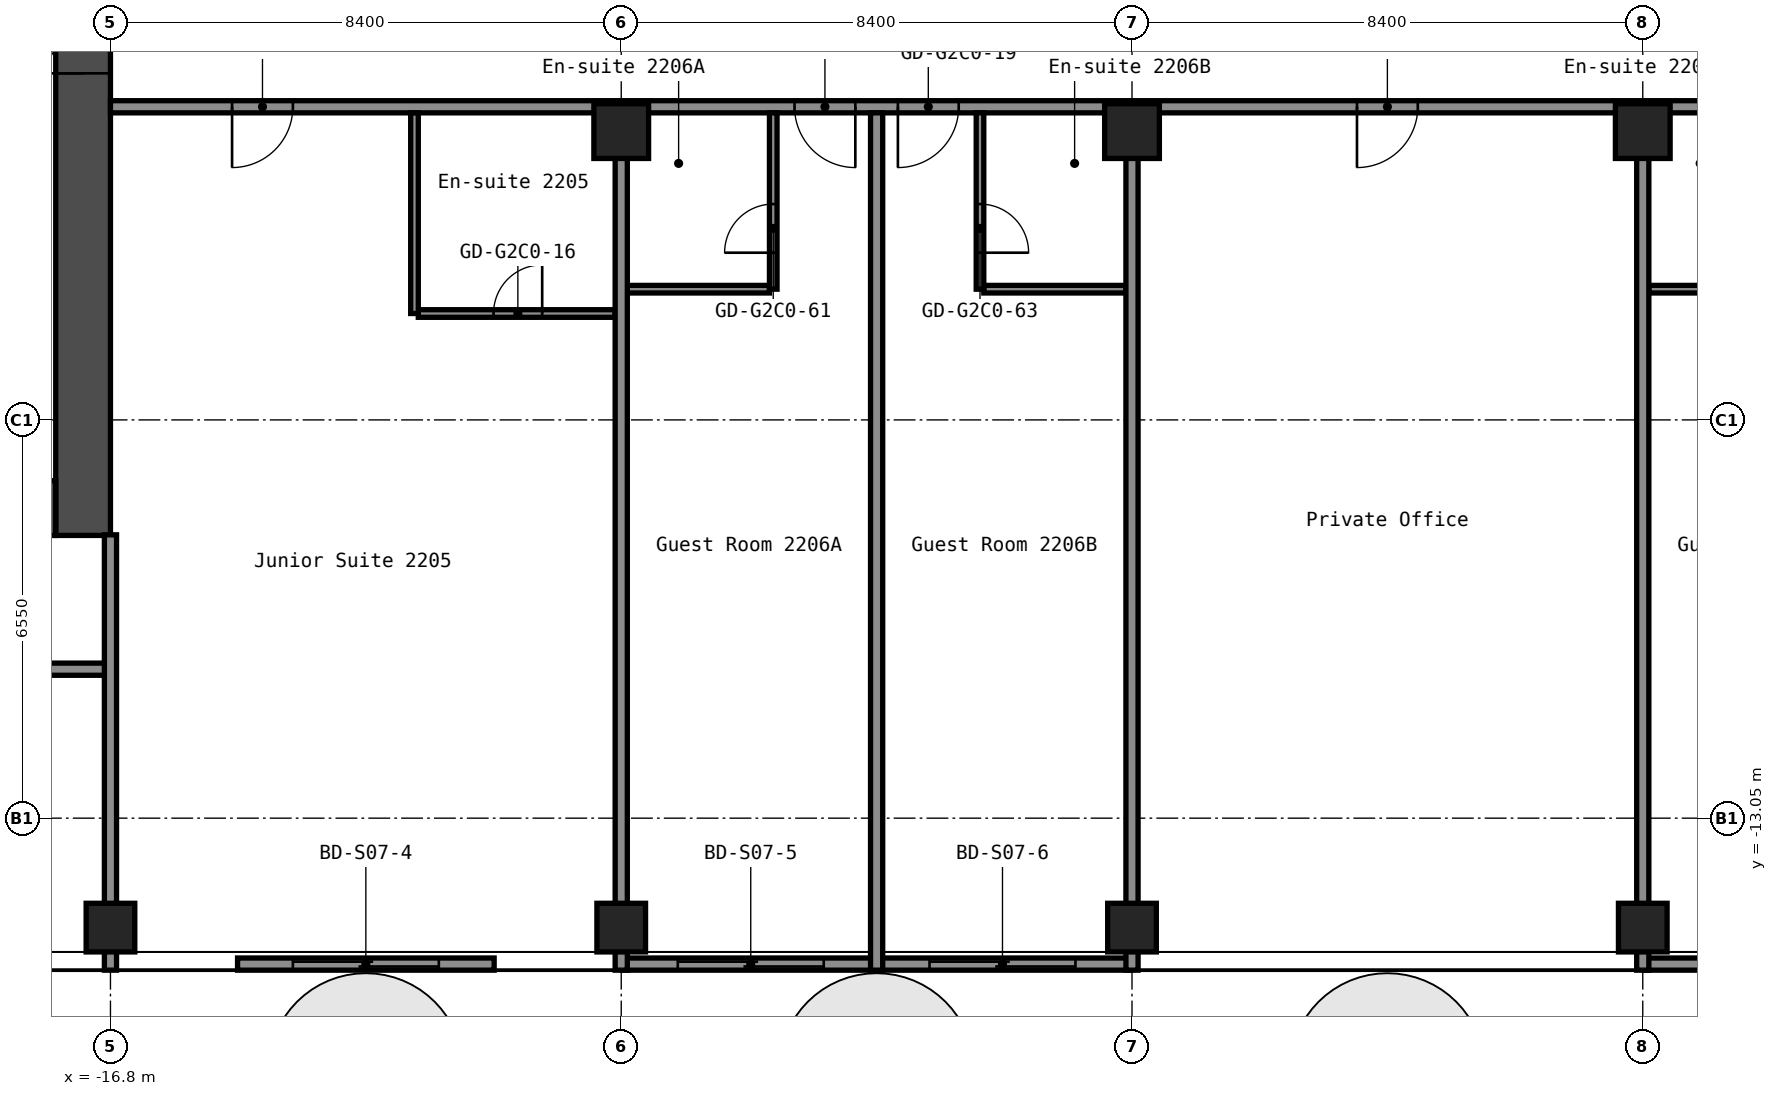
"""IFC4 building model, lengths in metres.
Left out: names, types, materials, properties, quantities, classifications, styles, units other than length and angle.
Written with IfcOpenShell. Run it as: python <this file> out.ifc"""

import sys

from ifc_helpers import new_model, si_unit, direction, frame, frame_2d, origin, origin_2d, place, context, subcontext, project, spatial, rectangle, hollow_rectangle, extrude, element, fill, save


model = new_model("IFC4")
c1 = context("Model", 3, precision=1e-05, world=origin(), true_north=direction((0.0, 1.0)))
c2 = subcontext(c1, "Body", "Model", "MODEL_VIEW")
j1 = project(units=[si_unit("LENGTHUNIT", "METRE"), si_unit("PLANEANGLEUNIT", "RADIAN")], contexts=[c1])
p1 = place(None, origin())
s1 = spatial("IfcSite", under=j1, at=p1, CompositionType="ELEMENT")
p2 = place(p1, origin())
s2 = spatial("IfcBuilding", under=s1, at=p2, CompositionType="ELEMENT")
p3 = place(p2, frame((0.0, 0.0, 81.8)))
s3 = spatial("IfcBuildingStorey", under=s2, at=p3, CompositionType="ELEMENT", Elevation=81.8)
for number, where, z_axis, x_axis in (
    (1, (-16.8, -14.85, 0.0), (0.0, 0.0, 1.0), (1.0, 0.0, 0.0)),
    (2, (-8.4, -14.85, 0.0), (0.0, 0.0, 1.0), (1.0, 0.0, 0.0)),
):
    element("IfcColumn", number, at=place(p3, frame(where, z_axis=z_axis, x_axis=x_axis)), inside=s3, PredefinedType="COLUMN", context=c2, shape_type="SweptSolid", body=[
        extrude(hollow_rectangle(XDim=0.8, YDim=0.8, WallThickness=0.032, at=origin_2d()), origin(), (0.0, 0.0, 1.0), 2.8),
    ])
p4 = place(p3, frame((-8.4, -1.75, 0.0), z_axis=(0.0, 0.0, 1.0), x_axis=(1.0, 0.0, 0.0)))
e3 = element("IfcColumn", 3, at=p4, inside=s3, PredefinedType="COLUMN", context=c2, shape_type="SweptSolid", body=[
    extrude(hollow_rectangle(XDim=0.9, YDim=0.9, WallThickness=0.036, at=origin_2d()), origin(), (0.0, 0.0, 1.0), 2.8),
])
p5 = place(p3, frame((0.0, -14.85, 0.0), z_axis=(0.0, 0.0, 1.0), x_axis=(1.0, 0.0, 0.0)))
e4 = element("IfcColumn", 4, at=p5, inside=s3, PredefinedType="COLUMN", context=c2, shape_type="SweptSolid", body=[
    extrude(hollow_rectangle(XDim=0.8, YDim=0.8, WallThickness=0.032, at=origin_2d()), origin(), (0.0, 0.0, 1.0), 2.8),
])
p6 = place(p3, frame((0.0, -1.75, 0.0), z_axis=(0.0, 0.0, 1.0), x_axis=(1.0, 0.0, 0.0)))
e5 = element("IfcColumn", 5, at=p6, inside=s3, PredefinedType="COLUMN", context=c2, shape_type="SweptSolid", body=[
    extrude(hollow_rectangle(XDim=0.9, YDim=0.9, WallThickness=0.036, at=origin_2d()), origin(), (0.0, 0.0, 1.0), 2.8),
])
p7 = place(p3, frame((8.4, -14.85, 0.0), z_axis=(0.0, 0.0, 1.0), x_axis=(1.0, 0.0, 0.0)))
e6 = element("IfcColumn", 6, at=p7, inside=s3, PredefinedType="COLUMN", context=c2, shape_type="SweptSolid", body=[
    extrude(hollow_rectangle(XDim=0.8, YDim=0.8, WallThickness=0.032, at=origin_2d()), origin(), (0.0, 0.0, 1.0), 2.8),
])
p8 = place(p3, frame((8.4, -1.75, 0.0), z_axis=(0.0, 0.0, 1.0), x_axis=(1.0, 0.0, 0.0)))
e7 = element("IfcColumn", 7, at=p8, inside=s3, PredefinedType="COLUMN", context=c2, shape_type="SweptSolid", body=[
    extrude(hollow_rectangle(XDim=0.9, YDim=0.9, WallThickness=0.036, at=origin_2d()), origin(), (0.0, 0.0, 1.0), 2.8),
])
p9 = place(p3, frame((-17.25, -8.4, 0.0), z_axis=(0.0, 0.0, 1.0), x_axis=(0.0, 1.0, 0.0)))
e8 = element("IfcWall", 8, at=p9, inside=s3, PredefinedType="SHEAR", context=c2, shape_type="SweptSolid", body=[
    extrude(rectangle(XDim=16.8, YDim=0.9, at=frame_2d((8.4, 0.0))), origin(), (0.0, 0.0, 1.0), 2.8),
])
p10 = place(p9, frame((7.6, 0.0, 0.0)))
e9 = element("IfcOpeningElement", 9, at=p10, cuts=e8, PredefinedType="OPENING", context=c2, shape_type="SweptSolid", body=[
    extrude(rectangle(XDim=1.2, YDim=2.1, at=frame_2d((0.6, 1.05))), frame((0.0, 0.46, 0.0), z_axis=(0.0, -1.0, 0.0), x_axis=(1.0, 0.0, 0.0)), (0.0, 0.0, 1.0), 0.92),
])
p11 = place(p3, frame((-32.7, -7.95, 0.0), z_axis=(0.0, 0.0, 1.0), x_axis=(1.0, 0.0, 0.0)))
e10 = element("IfcWall", 10, at=p11, inside=s3, PredefinedType="SHEAR", context=c2, shape_type="SweptSolid", body=[
    extrude(rectangle(XDim=15.0, YDim=0.9, at=frame_2d((7.5, 0.0))), origin(), (0.0, 0.0, 1.0), 2.8),
])
p12 = place(p11, frame((11.45, 0.0, 0.0)))
e11 = element("IfcOpeningElement", 11, at=p12, cuts=e10, PredefinedType="OPENING", context=c2, shape_type="SweptSolid", body=[
    extrude(rectangle(XDim=1.0, YDim=2.1, at=frame_2d((0.5, 1.05))), frame((0.0, 0.46, 0.0), z_axis=(0.0, -1.0, 0.0), x_axis=(1.0, 0.0, 0.0)), (0.0, 0.0, 1.0), 0.92),
])
p13 = place(p3, frame((-46.5, -10.6, 0.0), z_axis=(0.0, 0.0, 1.0), x_axis=(1.0, 0.0, 0.0)))
e12 = element("IfcWall", 12, at=p13, inside=s3, PredefinedType="PARTITIONING", context=c2, shape_type="SweptSolid", body=[
    extrude(rectangle(XDim=29.7, YDim=0.2, at=frame_2d((14.85, 0.0))), origin(), (0.0, 0.0, 1.0), 2.8),
])
p14 = place(p13, frame((1.95, 0.0, 0.0)))
e13 = element("IfcOpeningElement", 13, at=p14, cuts=e12, PredefinedType="OPENING", context=c2, shape_type="SweptSolid", body=[
    extrude(rectangle(XDim=0.9, YDim=2.1, at=frame_2d((0.45, 1.05))), frame((0.0, 0.11, 0.0), z_axis=(0.0, -1.0, 0.0), x_axis=(1.0, 0.0, 0.0)), (0.0, 0.0, 1.0), 0.22),
])
p15 = place(p13, frame((6.74, 0.0, 0.0)))
e14 = element("IfcOpeningElement", 14, at=p15, cuts=e12, PredefinedType="OPENING", context=c2, shape_type="SweptSolid", body=[
    extrude(rectangle(XDim=0.9, YDim=2.1, at=frame_2d((0.45, 1.05))), frame((0.0, 0.11, 0.0), z_axis=(0.0, -1.0, 0.0), x_axis=(1.0, 0.0, 0.0)), (0.0, 0.0, 1.0), 0.22),
])
p16 = place(p13, frame((10.94, 0.0, 0.0)))
e15 = element("IfcOpeningElement", 15, at=p16, cuts=e12, PredefinedType="OPENING", context=c2, shape_type="SweptSolid", body=[
    extrude(rectangle(XDim=0.9, YDim=2.1, at=frame_2d((0.45, 1.05))), frame((0.0, 0.11, 0.0), z_axis=(0.0, -1.0, 0.0), x_axis=(1.0, 0.0, 0.0)), (0.0, 0.0, 1.0), 0.22),
])
p17 = place(p13, frame((15.055, 0.0, 0.0)))
e16 = element("IfcOpeningElement", 16, at=p17, cuts=e12, PredefinedType="OPENING", context=c2, shape_type="SweptSolid", body=[
    extrude(rectangle(XDim=0.9, YDim=2.1, at=frame_2d((0.45, 1.05))), frame((0.0, 0.11, 0.0), z_axis=(0.0, -1.0, 0.0), x_axis=(1.0, 0.0, 0.0)), (0.0, 0.0, 1.0), 0.22),
])
p18 = place(p13, frame((19.255, 0.0, 0.0)))
e17 = element("IfcOpeningElement", 17, at=p18, cuts=e12, PredefinedType="OPENING", context=c2, shape_type="SweptSolid", body=[
    extrude(rectangle(XDim=0.9, YDim=2.1, at=frame_2d((0.45, 1.05))), frame((0.0, 0.11, 0.0), z_axis=(0.0, -1.0, 0.0), x_axis=(1.0, 0.0, 0.0)), (0.0, 0.0, 1.0), 0.22),
])
p19 = place(p13, frame((25.0, 0.0, 0.0)))
e18 = element("IfcOpeningElement", 18, at=p19, cuts=e12, PredefinedType="OPENING", context=c2, shape_type="SweptSolid", body=[
    extrude(rectangle(XDim=1.0, YDim=2.1, at=frame_2d((0.5, 1.05))), frame((0.0, 0.11, 0.0), z_axis=(0.0, -1.0, 0.0), x_axis=(1.0, 0.0, 0.0)), (0.0, 0.0, 1.0), 0.22),
])
p20 = place(p3, frame((-11.738, -4.75, 0.0), z_axis=(0.0, 0.0, 1.0), x_axis=(1.0, 0.0, 0.0)))
e19 = element("IfcWall", 19, at=p20, inside=s3, PredefinedType="PARTITIONING", context=c2, shape_type="SweptSolid", body=[
    extrude(rectangle(XDim=3.238, YDim=0.125, at=frame_2d((1.619, 0.0))), origin(), (0.0, 0.0, 1.0), 2.8),
])
p21 = place(p20, frame((1.238, 0.0, 0.0)))
e20 = element("IfcOpeningElement", 20, at=p21, cuts=e19, PredefinedType="OPENING", context=c2, shape_type="SweptSolid", body=[
    extrude(rectangle(XDim=0.8, YDim=2.1, at=frame_2d((0.4, 1.05))), frame((0.0, 0.073, 0.0), z_axis=(0.0, -1.0, 0.0), x_axis=(1.0, 0.0, 0.0)), (0.0, 0.0, 1.0), 0.145),
])
p22 = place(p3, frame((-8.3, -4.35, 0.0), z_axis=(0.0, 0.0, 1.0), x_axis=(1.0, 0.0, 0.0)))
e21 = element("IfcWall", 21, at=p22, inside=s3, PredefinedType="PARTITIONING", context=c2, shape_type="SweptSolid", body=[
    extrude(rectangle(XDim=2.338, YDim=0.125, at=frame_2d((1.169, 0.0))), origin(), (0.0, 0.0, 1.0), 2.8),
])
for number, where, z_axis, x_axis in (
    (22, (-2.438, -4.35, 0.0), (0.0, 0.0, 1.0), (1.0, 0.0, 0.0)),
    (23, (8.5, -4.35, 0.0), (0.0, 0.0, 1.0), (1.0, 0.0, 0.0)),
):
    element("IfcWall", number, at=place(p3, frame(where, z_axis=z_axis, x_axis=x_axis)), inside=s3, PredefinedType="PARTITIONING", context=c2, shape_type="SweptSolid", body=[
        extrude(rectangle(XDim=2.337, YDim=0.125, at=frame_2d((1.169, 0.0))), origin(), (0.0, 0.0, 1.0), 2.8),
    ])
p23 = place(p3, frame((-16.8, -1.35, 0.0), z_axis=(0.0, 0.0, 1.0), x_axis=(1.0, 0.0, 0.0)))
e24 = element("IfcWall", 24, at=p23, inside=s3, PredefinedType="PARTITIONING", context=c2, shape_type="SweptSolid", body=[
    extrude(rectangle(XDim=33.6, YDim=0.2, at=frame_2d((16.8, 0.0))), origin(), (0.0, 0.0, 1.0), 2.8),
])
p24 = place(p23, frame((2.0, 0.0, 0.0)))
e25 = element("IfcOpeningElement", 25, at=p24, cuts=e24, PredefinedType="OPENING", context=c2, shape_type="SweptSolid", body=[
    extrude(rectangle(XDim=1.0, YDim=2.1, at=frame_2d((0.5, 1.05))), frame((0.0, 0.11, 0.0), z_axis=(0.0, -1.0, 0.0), x_axis=(1.0, 0.0, 0.0)), (0.0, 0.0, 1.0), 0.22),
])
p25 = place(p23, frame((11.25, 0.0, 0.0)))
e26 = element("IfcOpeningElement", 26, at=p25, cuts=e24, PredefinedType="OPENING", context=c2, shape_type="SweptSolid", body=[
    extrude(rectangle(XDim=1.0, YDim=2.1, at=frame_2d((0.5, 1.05))), frame((0.0, 0.11, 0.0), z_axis=(0.0, -1.0, 0.0), x_axis=(1.0, 0.0, 0.0)), (0.0, 0.0, 1.0), 0.22),
])
p26 = place(p23, frame((12.95, 0.0, 0.0)))
e27 = element("IfcOpeningElement", 27, at=p26, cuts=e24, PredefinedType="OPENING", context=c2, shape_type="SweptSolid", body=[
    extrude(rectangle(XDim=1.0, YDim=2.1, at=frame_2d((0.5, 1.05))), frame((0.0, 0.11, 0.0), z_axis=(0.0, -1.0, 0.0), x_axis=(1.0, 0.0, 0.0)), (0.0, 0.0, 1.0), 0.22),
])
p27 = place(p23, frame((20.5, 0.0, 0.0)))
e28 = element("IfcOpeningElement", 28, at=p27, cuts=e24, PredefinedType="OPENING", context=c2, shape_type="SweptSolid", body=[
    extrude(rectangle(XDim=1.0, YDim=2.1, at=frame_2d((0.5, 1.05))), frame((0.0, 0.11, 0.0), z_axis=(0.0, -1.0, 0.0), x_axis=(1.0, 0.0, 0.0)), (0.0, 0.0, 1.0), 0.22),
])
p28 = place(p23, frame((28.05, 0.0, 0.0)))
e29 = element("IfcOpeningElement", 29, at=p28, cuts=e24, PredefinedType="OPENING", context=c2, shape_type="SweptSolid", body=[
    extrude(rectangle(XDim=1.0, YDim=2.1, at=frame_2d((0.5, 1.05))), frame((0.0, 0.11, 0.0), z_axis=(0.0, -1.0, 0.0), x_axis=(1.0, 0.0, 0.0)), (0.0, 0.0, 1.0), 0.22),
])
p29 = place(p23, frame((29.75, 0.0, 0.0)))
e30 = element("IfcOpeningElement", 30, at=p29, cuts=e24, PredefinedType="OPENING", context=c2, shape_type="SweptSolid", body=[
    extrude(rectangle(XDim=1.0, YDim=2.1, at=frame_2d((0.5, 1.05))), frame((0.0, 0.11, 0.0), z_axis=(0.0, -1.0, 0.0), x_axis=(1.0, 0.0, 0.0)), (0.0, 0.0, 1.0), 0.22),
])
p30 = place(p3, frame((-16.8, -15.55, 0.0), z_axis=(0.0, 0.0, 1.0), x_axis=(0.0, 1.0, 0.0)))
e31 = element("IfcWall", 31, at=p30, inside=s3, PredefinedType="PARTITIONING", context=c2, shape_type="SweptSolid", body=[
    extrude(rectangle(XDim=7.16, YDim=0.2, at=frame_2d((3.58, 0.0))), origin(), (0.0, 0.0, 1.0), 2.8),
])
p31 = place(p3, frame((-11.8, -4.75, 0.0), z_axis=(0.0, 0.0, 1.0), x_axis=(0.0, 1.0, 0.0)))
e32 = element("IfcWall", 32, at=p31, inside=s3, PredefinedType="PARTITIONING", context=c2, shape_type="SweptSolid", body=[
    extrude(rectangle(XDim=3.3, YDim=0.125, at=frame_2d((1.65, 0.0))), origin(), (0.0, 0.0, 1.0), 2.8),
])
p32 = place(p3, frame((-8.4, -15.55, 0.0), z_axis=(0.0, 0.0, 1.0), x_axis=(0.0, 1.0, 0.0)))
e33 = element("IfcWall", 33, at=p32, inside=s3, PredefinedType="PARTITIONING", context=c2, shape_type="SweptSolid", body=[
    extrude(rectangle(XDim=13.36, YDim=0.2, at=frame_2d((6.68, 0.0))), origin(), (0.0, 0.0, 1.0), 2.8),
])
p33 = place(p3, frame((-5.9, -4.35, 0.0), z_axis=(0.0, 0.0, 1.0), x_axis=(0.0, 1.0, 0.0)))
e34 = element("IfcWall", 34, at=p33, inside=s3, PredefinedType="PARTITIONING", context=c2, shape_type="SweptSolid", body=[
    extrude(rectangle(XDim=2.9, YDim=0.125, at=frame_2d((1.45, 0.0))), origin(), (0.0, 0.0, 1.0), 2.8),
])
p34 = place(p33, frame((0.6, 0.0, 0.0)))
e35 = element("IfcOpeningElement", 35, at=p34, cuts=e34, PredefinedType="OPENING", context=c2, shape_type="SweptSolid", body=[
    extrude(rectangle(XDim=0.8, YDim=2.1, at=frame_2d((0.4, 1.05))), frame((0.0, 0.073, 0.0), z_axis=(0.0, -1.0, 0.0), x_axis=(1.0, 0.0, 0.0)), (0.0, 0.0, 1.0), 0.145),
])
p35 = place(p3, frame((-4.2, -15.55, 0.0), z_axis=(0.0, 0.0, 1.0), x_axis=(0.0, 1.0, 0.0)))
e36 = element("IfcWall", 36, at=p35, inside=s3, PredefinedType="PARTITIONING", context=c2, shape_type="SweptSolid", body=[
    extrude(rectangle(XDim=14.1, YDim=0.2, at=frame_2d((7.05, 0.0))), origin(), (0.0, 0.0, 1.0), 2.8),
])
p36 = place(p3, frame((-2.5, -4.35, 0.0), z_axis=(0.0, 0.0, 1.0), x_axis=(0.0, 1.0, 0.0)))
e37 = element("IfcWall", 37, at=p36, inside=s3, PredefinedType="PARTITIONING", context=c2, shape_type="SweptSolid", body=[
    extrude(rectangle(XDim=2.9, YDim=0.125, at=frame_2d((1.45, 0.0))), origin(), (0.0, 0.0, 1.0), 2.8),
])
p37 = place(p36, frame((0.6, 0.0, 0.0)))
e38 = element("IfcOpeningElement", 38, at=p37, cuts=e37, PredefinedType="OPENING", context=c2, shape_type="SweptSolid", body=[
    extrude(rectangle(XDim=0.8, YDim=2.1, at=frame_2d((0.4, 1.05))), frame((0.0, 0.073, 0.0), z_axis=(0.0, -1.0, 0.0), x_axis=(1.0, 0.0, 0.0)), (0.0, 0.0, 1.0), 0.145),
])
for number, where, z_axis, x_axis in (
    (39, (0.0, -15.55, 0.0), (0.0, 0.0, 1.0), (0.0, 1.0, 0.0)),
    (40, (8.4, -15.55, 0.0), (0.0, 0.0, 1.0), (0.0, 1.0, 0.0)),
):
    element("IfcWall", number, at=place(p3, frame(where, z_axis=z_axis, x_axis=x_axis)), inside=s3, PredefinedType="PARTITIONING", context=c2, shape_type="SweptSolid", body=[
        extrude(rectangle(XDim=13.36, YDim=0.2, at=frame_2d((6.68, 0.0))), origin(), (0.0, 0.0, 1.0), 2.8),
    ])
p38 = place(p3, frame((-14.71, -15.45, 0.0), z_axis=(0.0, 0.0, 1.0), x_axis=(1.0, 0.0, 0.0)))
p39 = place(p38, frame((0.91, 0.0, 0.0)))
p40 = place(p39, frame((2.4, 0.0, 0.0), z_axis=(0.0, 0.0, 1.0), x_axis=(-1.0, 0.0, 0.0)))
e41 = element("IfcDoor", 41, at=p40, inside=s3, OperationType="SLIDING_TO_LEFT", PredefinedType="DOOR", context=c2, shape_type="SweptSolid", body=[
    extrude(rectangle(XDim=2.4, YDim=2.2, at=frame_2d((1.2, 1.1))), frame((0.0, 0.025, 0.0), z_axis=(0.0, -1.0, 0.0), x_axis=(1.0, 0.0, 0.0)), (0.0, 0.0, 1.0), 0.05),
])
p41 = place(p3, frame((-8.38, -15.45, 0.0), z_axis=(0.0, 0.0, 1.0), x_axis=(1.0, 0.0, 0.0)))
p42 = place(p41, frame((0.91, 0.0, 0.0)))
p43 = place(p42, frame((2.4, 0.0, 0.0), z_axis=(0.0, 0.0, 1.0), x_axis=(-1.0, 0.0, 0.0)))
e42 = element("IfcDoor", 42, at=p43, inside=s3, OperationType="SLIDING_TO_LEFT", PredefinedType="DOOR", context=c2, shape_type="SweptSolid", body=[
    extrude(rectangle(XDim=2.4, YDim=2.2, at=frame_2d((1.2, 1.1))), frame((0.0, 0.025, 0.0), z_axis=(0.0, -1.0, 0.0), x_axis=(1.0, 0.0, 0.0)), (0.0, 0.0, 1.0), 0.05),
])
p44 = place(p3, frame((-4.24, -15.45, 0.0), z_axis=(0.0, 0.0, 1.0), x_axis=(1.0, 0.0, 0.0)))
p45 = place(p44, frame((0.91, 0.0, 0.0)))
p46 = place(p45, frame((2.4, 0.0, 0.0), z_axis=(0.0, 0.0, 1.0), x_axis=(-1.0, 0.0, 0.0)))
e43 = element("IfcDoor", 43, at=p46, inside=s3, OperationType="SLIDING_TO_LEFT", PredefinedType="DOOR", context=c2, shape_type="SweptSolid", body=[
    extrude(rectangle(XDim=2.4, YDim=2.2, at=frame_2d((1.2, 1.1))), frame((0.0, 0.025, 0.0), z_axis=(0.0, -1.0, 0.0), x_axis=(1.0, 0.0, 0.0)), (0.0, 0.0, 1.0), 0.05),
])
p47 = place(p10, origin())
e44 = element("IfcDoor", 44, at=p47, inside=s3, OperationType="DOUBLE_DOOR_SINGLE_SWING", PredefinedType="DOOR", context=c2, shape_type="SweptSolid", body=[
    extrude(rectangle(XDim=1.2, YDim=2.1, at=frame_2d((0.6, 1.05))), frame((0.0, 0.025, 0.0), z_axis=(0.0, -1.0, 0.0), x_axis=(1.0, 0.0, 0.0)), (0.0, 0.0, 1.0), 0.05),
])
fill(e9, e44)
p48 = place(p21, origin())
e45 = element("IfcDoor", 45, at=p48, inside=s3, OperationType="SINGLE_SWING_LEFT", PredefinedType="DOOR", context=c2, shape_type="SweptSolid", body=[
    extrude(rectangle(XDim=0.8, YDim=2.1, at=frame_2d((0.4, 1.05))), frame((0.0, 0.025, 0.0), z_axis=(0.0, -1.0, 0.0), x_axis=(1.0, 0.0, 0.0)), (0.0, 0.0, 1.0), 0.05),
])
fill(e20, e45)
p49 = place(p24, origin())
e46 = element("IfcDoor", 46, at=p49, inside=s3, OperationType="SINGLE_SWING_LEFT", PredefinedType="DOOR", context=c2, shape_type="SweptSolid", body=[
    extrude(rectangle(XDim=1.0, YDim=2.1, at=frame_2d((0.5, 1.05))), frame((0.0, 0.025, 0.0), z_axis=(0.0, -1.0, 0.0), x_axis=(1.0, 0.0, 0.0)), (0.0, 0.0, 1.0), 0.05),
])
fill(e25, e46)
p50 = place(p25, origin())
e47 = element("IfcDoor", 47, at=p50, inside=s3, OperationType="SINGLE_SWING_RIGHT", PredefinedType="DOOR", context=c2, shape_type="SweptSolid", body=[
    extrude(rectangle(XDim=1.0, YDim=2.1, at=frame_2d((0.5, 1.05))), frame((0.0, 0.025, 0.0), z_axis=(0.0, -1.0, 0.0), x_axis=(1.0, 0.0, 0.0)), (0.0, 0.0, 1.0), 0.05),
])
fill(e26, e47)
p51 = place(p26, origin())
e48 = element("IfcDoor", 48, at=p51, inside=s3, OperationType="SINGLE_SWING_LEFT", PredefinedType="DOOR", context=c2, shape_type="SweptSolid", body=[
    extrude(rectangle(XDim=1.0, YDim=2.1, at=frame_2d((0.5, 1.05))), frame((0.0, 0.025, 0.0), z_axis=(0.0, -1.0, 0.0), x_axis=(1.0, 0.0, 0.0)), (0.0, 0.0, 1.0), 0.05),
])
fill(e27, e48)
p52 = place(p27, origin())
e49 = element("IfcDoor", 49, at=p52, inside=s3, OperationType="SINGLE_SWING_LEFT", PredefinedType="DOOR", context=c2, shape_type="SweptSolid", body=[
    extrude(rectangle(XDim=1.0, YDim=2.1, at=frame_2d((0.5, 1.05))), frame((0.0, 0.025, 0.0), z_axis=(0.0, -1.0, 0.0), x_axis=(1.0, 0.0, 0.0)), (0.0, 0.0, 1.0), 0.05),
])
fill(e28, e49)
p53 = place(p34, origin())
e50 = element("IfcDoor", 50, at=p53, inside=s3, OperationType="SINGLE_SWING_RIGHT", PredefinedType="DOOR", context=c2, shape_type="SweptSolid", body=[
    extrude(rectangle(XDim=0.8, YDim=2.1, at=frame_2d((0.4, 1.05))), frame((0.0, 0.025, 0.0), z_axis=(0.0, -1.0, 0.0), x_axis=(1.0, 0.0, 0.0)), (0.0, 0.0, 1.0), 0.05),
])
fill(e35, e50)
p54 = place(p37, origin())
e51 = element("IfcDoor", 51, at=p54, inside=s3, OperationType="SINGLE_SWING_LEFT", PredefinedType="DOOR", context=c2, shape_type="SweptSolid", body=[
    extrude(rectangle(XDim=0.8, YDim=2.1, at=frame_2d((0.4, 1.05))), frame((0.0, 0.025, 0.0), z_axis=(0.0, -1.0, 0.0), x_axis=(1.0, 0.0, 0.0)), (0.0, 0.0, 1.0), 0.05),
])
fill(e38, e51)
save(model, sys.argv[1])
